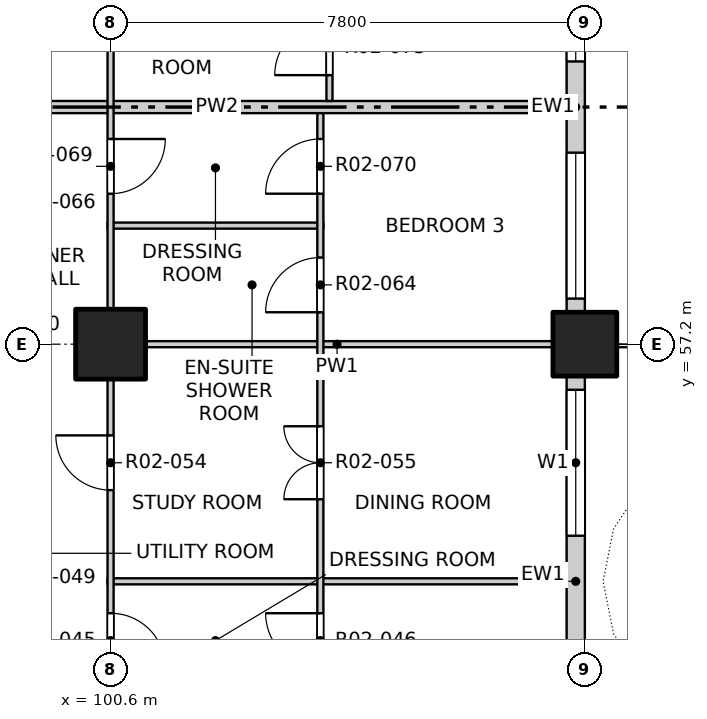
"""IFC4 building model, lengths in metres.
Left out: names, types, materials, properties, quantities, classifications, styles, units other than length and angle.
Written with IfcOpenShell. Run it as: python <this file> out.ifc"""

import sys

from ifc_helpers import new_model, si_unit, direction, frame, frame_2d, origin, origin_2d, place, context, subcontext, project, spatial, rectangle, extrude, element, fill, save


model = new_model("IFC4")
c1 = context("Model", 3, precision=1e-05, world=origin(), true_north=direction((0.0, 1.0)))
c2 = subcontext(c1, "Body", "Model", "MODEL_VIEW")
j1 = project(units=[si_unit("LENGTHUNIT", "METRE"), si_unit("PLANEANGLEUNIT", "RADIAN")], contexts=[c1])
p1 = place(None, origin())
s1 = spatial("IfcSite", under=j1, at=p1, CompositionType="ELEMENT")
p2 = place(p1, origin())
s2 = spatial("IfcBuilding", under=s1, at=p2, CompositionType="ELEMENT")
p3 = place(p2, frame((0.0, 0.0, 36.5)))
s3 = spatial("IfcBuildingStorey", under=s2, at=p3, CompositionType="ELEMENT", Elevation=36.5)
p4 = place(p3, frame((108.4, 57.2, -0.25), z_axis=(0.0, 0.0, 1.0), x_axis=(1.0, 0.0, 0.0)))
e1 = element("IfcColumn", 1, at=p4, inside=s3, PredefinedType="COLUMN", context=c2, shape_type="SweptSolid", body=[
    extrude(rectangle(XDim=1.05, YDim=1.05, at=origin_2d()), origin(), (0.0, 0.0, 1.0), 3.4),
])
p5 = place(p3, frame((100.6, 57.2, -0.25), z_axis=(0.0, 0.0, 1.0), x_axis=(1.0, 0.0, 0.0)))
e2 = element("IfcColumn", 2, at=p5, inside=s3, PredefinedType="COLUMN", context=c2, shape_type="SweptSolid", body=[
    extrude(rectangle(XDim=1.15, YDim=1.15, at=origin_2d()), origin(), (0.0, 0.0, 1.0), 3.4),
])
p6 = place(p3, frame((108.25, 49.925, 0.0), z_axis=(0.0, 0.0, 1.0), x_axis=(0.0, 1.0, 0.0)))
e3 = element("IfcWall", 3, at=p6, inside=s3, PredefinedType="SOLIDWALL", context=c2, shape_type="SweptSolid", body=[
    extrude(rectangle(XDim=6.75, YDim=0.3, at=frame_2d((3.375, 0.0))), origin(), (0.0, 0.0, 1.0), 2.7),
])
p7 = place(p6, frame((0.525, 0.0, 0.0)))
e4 = element("IfcOpeningElement", 4, at=p7, cuts=e3, PredefinedType="OPENING", context=c2, shape_type="SweptSolid", body=[
    extrude(rectangle(XDim=1.8, YDim=2.4, at=frame_2d((0.9, 1.2))), frame((0.0, 0.16, 0.0), z_axis=(0.0, -1.0, 0.0), x_axis=(1.0, 0.0, 0.0)), (0.0, 0.0, 1.0), 0.32),
])
p8 = place(p6, frame((4.125, 0.0, 0.9)))
e5 = element("IfcOpeningElement", 5, at=p8, cuts=e3, PredefinedType="OPENING", context=c2, shape_type="SweptSolid", body=[
    extrude(rectangle(XDim=2.4, YDim=1.8, at=frame_2d((1.2, 0.9))), frame((0.0, 0.16, 0.0), z_axis=(0.0, -1.0, 0.0), x_axis=(1.0, 0.0, 0.0)), (0.0, 0.0, 1.0), 0.32),
])
p9 = place(p3, frame((108.25, 57.725, 0.0), z_axis=(0.0, 0.0, 1.0), x_axis=(0.0, 1.0, 0.0)))
e6 = element("IfcWall", 6, at=p9, inside=s3, PredefinedType="SOLIDWALL", context=c2, shape_type="SweptSolid", body=[
    extrude(rectangle(XDim=6.75, YDim=0.3, at=frame_2d((3.375, 0.0))), origin(), (0.0, 0.0, 1.0), 2.7),
])
p10 = place(p9, frame((0.225, 0.0, 0.9)))
e7 = element("IfcOpeningElement", 7, at=p10, cuts=e6, PredefinedType="OPENING", context=c2, shape_type="SweptSolid", body=[
    extrude(rectangle(XDim=2.4, YDim=1.8, at=frame_2d((1.2, 0.9))), frame((0.0, 0.16, 0.0), z_axis=(0.0, -1.0, 0.0), x_axis=(1.0, 0.0, 0.0)), (0.0, 0.0, 1.0), 0.32),
])
p11 = place(p9, frame((4.125, 0.0, 0.9)))
e8 = element("IfcOpeningElement", 8, at=p11, cuts=e6, PredefinedType="OPENING", context=c2, shape_type="SweptSolid", body=[
    extrude(rectangle(XDim=2.4, YDim=1.8, at=frame_2d((1.2, 0.9))), frame((0.0, 0.16, 0.0), z_axis=(0.0, -1.0, 0.0), x_axis=(1.0, 0.0, 0.0)), (0.0, 0.0, 1.0), 0.32),
])
p12 = place(p3, frame((100.55, 53.3, 0.0), z_axis=(0.0, 0.0, 1.0), x_axis=(1.0, 0.0, 0.0)))
e9 = element("IfcWall", 9, at=p12, inside=s3, PredefinedType="PARTITIONING", context=c2, shape_type="SweptSolid", body=[
    extrude(rectangle(XDim=7.55, YDim=0.1, at=frame_2d((3.775, 0.0))), origin(), (0.0, 0.0, 1.0), 3.15),
])
p13 = place(p3, frame((100.55, 57.2, 0.0), z_axis=(0.0, 0.0, 1.0), x_axis=(1.0, 0.0, 0.0)))
e10 = element("IfcWall", 10, at=p13, inside=s3, PredefinedType="PARTITIONING", context=c2, shape_type="SweptSolid", body=[
    extrude(rectangle(XDim=7.55, YDim=0.1, at=frame_2d((3.775, 0.0))), origin(), (0.0, 0.0, 1.0), 2.55),
])
p14 = place(p3, frame((100.55, 59.15, 0.0), z_axis=(0.0, 0.0, 1.0), x_axis=(1.0, 0.0, 0.0)))
e11 = element("IfcWall", 11, at=p14, inside=s3, PredefinedType="PARTITIONING", context=c2, shape_type="SweptSolid", body=[
    extrude(rectangle(XDim=3.55, YDim=0.1, at=frame_2d((1.775, 0.0))), origin(), (0.0, 0.0, 1.0), 3.15),
])
p15 = place(p3, frame((96.6, 61.1, 0.0), z_axis=(0.0, 0.0, 1.0), x_axis=(1.0, 0.0, 0.0)))
e12 = element("IfcWall", 12, at=p15, inside=s3, PredefinedType="PARTITIONING", context=c2, shape_type="SweptSolid", body=[
    extrude(rectangle(XDim=11.5, YDim=0.2, at=frame_2d((5.75, 0.0))), origin(), (0.0, 0.0, 1.0), 3.15),
])
p16 = place(p3, frame((100.6, 49.4, 0.0), z_axis=(0.0, 0.0, 1.0), x_axis=(0.0, 1.0, 0.0)))
e13 = element("IfcWall", 13, at=p16, inside=s3, PredefinedType="PARTITIONING", context=c2, shape_type="SweptSolid", body=[
    extrude(rectangle(XDim=31.2, YDim=0.1, at=frame_2d((15.6, 0.0))), origin(), (0.0, 0.0, 1.0), 3.15),
])
p17 = place(p16, frame((2.475, 0.0, 0.0)))
e14 = element("IfcOpeningElement", 14, at=p17, cuts=e13, PredefinedType="OPENING", context=c2, shape_type="SweptSolid", body=[
    extrude(rectangle(XDim=0.9, YDim=2.1, at=frame_2d((0.45, 1.05))), frame((0.0, 0.06, 0.0), z_axis=(0.0, -1.0, 0.0), x_axis=(1.0, 0.0, 0.0)), (0.0, 0.0, 1.0), 0.12),
])
p18 = place(p16, frame((5.4, 0.0, 0.0)))
e15 = element("IfcOpeningElement", 15, at=p18, cuts=e13, PredefinedType="OPENING", context=c2, shape_type="SweptSolid", body=[
    extrude(rectangle(XDim=0.9, YDim=2.1, at=frame_2d((0.45, 1.05))), frame((0.0, 0.06, 0.0), z_axis=(0.0, -1.0, 0.0), x_axis=(1.0, 0.0, 0.0)), (0.0, 0.0, 1.0), 0.12),
])
p19 = place(p16, frame((10.275, 0.0, 0.0)))
e16 = element("IfcOpeningElement", 16, at=p19, cuts=e13, PredefinedType="OPENING", context=c2, shape_type="SweptSolid", body=[
    extrude(rectangle(XDim=0.9, YDim=2.1, at=frame_2d((0.45, 1.05))), frame((0.0, 0.06, 0.0), z_axis=(0.0, -1.0, 0.0), x_axis=(1.0, 0.0, 0.0)), (0.0, 0.0, 1.0), 0.12),
])
p20 = place(p16, frame((14.0, 0.0, 0.0)))
e17 = element("IfcOpeningElement", 17, at=p20, cuts=e13, PredefinedType="OPENING", context=c2, shape_type="SweptSolid", body=[
    extrude(rectangle(XDim=0.9, YDim=2.1, at=frame_2d((0.45, 1.05))), frame((0.0, 0.06, 0.0), z_axis=(0.0, -1.0, 0.0), x_axis=(1.0, 0.0, 0.0)), (0.0, 0.0, 1.0), 0.12),
])
p21 = place(p16, frame((17.1, 0.0, 0.0)))
e18 = element("IfcOpeningElement", 18, at=p21, cuts=e13, PredefinedType="OPENING", context=c2, shape_type="SweptSolid", body=[
    extrude(rectangle(XDim=0.9, YDim=2.1, at=frame_2d((0.45, 1.05))), frame((0.0, 0.06, 0.0), z_axis=(0.0, -1.0, 0.0), x_axis=(1.0, 0.0, 0.0)), (0.0, 0.0, 1.0), 0.12),
])
p22 = place(p16, frame((21.0, 0.0, 0.0)))
e19 = element("IfcOpeningElement", 19, at=p22, cuts=e13, PredefinedType="OPENING", context=c2, shape_type="SweptSolid", body=[
    extrude(rectangle(XDim=0.9, YDim=2.1, at=frame_2d((0.45, 1.05))), frame((0.0, 0.06, 0.0), z_axis=(0.0, -1.0, 0.0), x_axis=(1.0, 0.0, 0.0)), (0.0, 0.0, 1.0), 0.12),
])
p23 = place(p16, frame((25.875, 0.0, 0.0)))
e20 = element("IfcOpeningElement", 20, at=p23, cuts=e13, PredefinedType="OPENING", context=c2, shape_type="SweptSolid", body=[
    extrude(rectangle(XDim=0.9, YDim=2.1, at=frame_2d((0.45, 1.05))), frame((0.0, 0.06, 0.0), z_axis=(0.0, -1.0, 0.0), x_axis=(1.0, 0.0, 0.0)), (0.0, 0.0, 1.0), 0.12),
])
p24 = place(p16, frame((29.6, 0.0, 0.0)))
e21 = element("IfcOpeningElement", 21, at=p24, cuts=e13, PredefinedType="OPENING", context=c2, shape_type="SweptSolid", body=[
    extrude(rectangle(XDim=0.9, YDim=2.1, at=frame_2d((0.45, 1.05))), frame((0.0, 0.06, 0.0), z_axis=(0.0, -1.0, 0.0), x_axis=(1.0, 0.0, 0.0)), (0.0, 0.0, 1.0), 0.12),
])
p25 = place(p3, frame((104.05, 41.9, 0.0), z_axis=(0.0, 0.0, 1.0), x_axis=(0.0, 1.0, 0.0)))
e22 = element("IfcWall", 22, at=p25, inside=s3, PredefinedType="PARTITIONING", context=c2, shape_type="SweptSolid", body=[
    extrude(rectangle(XDim=19.1, YDim=0.1, at=frame_2d((9.55, 0.0))), origin(), (0.0, 0.0, 1.0), 3.15),
])
p26 = place(p25, frame((1.05, 0.0, 0.0)))
e23 = element("IfcOpeningElement", 23, at=p26, cuts=e22, PredefinedType="OPENING", context=c2, shape_type="SweptSolid", body=[
    extrude(rectangle(XDim=1.2, YDim=2.1, at=frame_2d((0.6, 1.05))), frame((0.0, 0.06, 0.0), z_axis=(0.0, -1.0, 0.0), x_axis=(1.0, 0.0, 0.0)), (0.0, 0.0, 1.0), 0.12),
])
p27 = place(p25, frame((4.95, 0.0, 0.0)))
e24 = element("IfcOpeningElement", 24, at=p27, cuts=e22, PredefinedType="OPENING", context=c2, shape_type="SweptSolid", body=[
    extrude(rectangle(XDim=1.2, YDim=2.1, at=frame_2d((0.6, 1.05))), frame((0.0, 0.06, 0.0), z_axis=(0.0, -1.0, 0.0), x_axis=(1.0, 0.0, 0.0)), (0.0, 0.0, 1.0), 0.12),
])
p28 = place(p25, frame((8.025, 0.0, 0.0)))
e25 = element("IfcOpeningElement", 25, at=p28, cuts=e22, PredefinedType="OPENING", context=c2, shape_type="SweptSolid", body=[
    extrude(rectangle(XDim=0.9, YDim=2.1, at=frame_2d((0.45, 1.05))), frame((0.0, 0.06, 0.0), z_axis=(0.0, -1.0, 0.0), x_axis=(1.0, 0.0, 0.0)), (0.0, 0.0, 1.0), 0.12),
])
p29 = place(p25, frame((9.975, 0.0, 0.0)))
e26 = element("IfcOpeningElement", 26, at=p29, cuts=e22, PredefinedType="OPENING", context=c2, shape_type="SweptSolid", body=[
    extrude(rectangle(XDim=0.9, YDim=2.1, at=frame_2d((0.45, 1.05))), frame((0.0, 0.06, 0.0), z_axis=(0.0, -1.0, 0.0), x_axis=(1.0, 0.0, 0.0)), (0.0, 0.0, 1.0), 0.12),
])
p30 = place(p25, frame((12.75, 0.0, 0.0)))
e27 = element("IfcOpeningElement", 27, at=p30, cuts=e22, PredefinedType="OPENING", context=c2, shape_type="SweptSolid", body=[
    extrude(rectangle(XDim=1.2, YDim=2.1, at=frame_2d((0.6, 1.05))), frame((0.0, 0.06, 0.0), z_axis=(0.0, -1.0, 0.0), x_axis=(1.0, 0.0, 0.0)), (0.0, 0.0, 1.0), 0.12),
])
p31 = place(p25, frame((15.825, 0.0, 0.0)))
e28 = element("IfcOpeningElement", 28, at=p31, cuts=e22, PredefinedType="OPENING", context=c2, shape_type="SweptSolid", body=[
    extrude(rectangle(XDim=0.9, YDim=2.1, at=frame_2d((0.45, 1.05))), frame((0.0, 0.06, 0.0), z_axis=(0.0, -1.0, 0.0), x_axis=(1.0, 0.0, 0.0)), (0.0, 0.0, 1.0), 0.12),
])
p32 = place(p25, frame((17.775, 0.0, 0.0)))
e29 = element("IfcOpeningElement", 29, at=p32, cuts=e22, PredefinedType="OPENING", context=c2, shape_type="SweptSolid", body=[
    extrude(rectangle(XDim=0.9, YDim=2.1, at=frame_2d((0.45, 1.05))), frame((0.0, 0.06, 0.0), z_axis=(0.0, -1.0, 0.0), x_axis=(1.0, 0.0, 0.0)), (0.0, 0.0, 1.0), 0.12),
])
p33 = place(p3, frame((104.2, 61.2, 0.0), z_axis=(0.0, 0.0, 1.0), x_axis=(0.0, 1.0, 0.0)))
e30 = element("IfcWall", 30, at=p33, inside=s3, PredefinedType="PARTITIONING", context=c2, shape_type="SweptSolid", body=[
    extrude(rectangle(XDim=11.5, YDim=0.1, at=frame_2d((5.75, 0.0))), origin(), (0.0, 0.0, 1.0), 3.15),
])
p34 = place(p33, frame((0.425, 0.0, 0.0)))
e31 = element("IfcOpeningElement", 31, at=p34, cuts=e30, PredefinedType="OPENING", context=c2, shape_type="SweptSolid", body=[
    extrude(rectangle(XDim=0.9, YDim=2.1, at=frame_2d((0.45, 1.05))), frame((0.0, 0.06, 0.0), z_axis=(0.0, -1.0, 0.0), x_axis=(1.0, 0.0, 0.0)), (0.0, 0.0, 1.0), 0.12),
])
p35 = place(p33, frame((2.375, 0.0, 0.0)))
e32 = element("IfcOpeningElement", 32, at=p35, cuts=e30, PredefinedType="OPENING", context=c2, shape_type="SweptSolid", body=[
    extrude(rectangle(XDim=0.9, YDim=2.1, at=frame_2d((0.45, 1.05))), frame((0.0, 0.06, 0.0), z_axis=(0.0, -1.0, 0.0), x_axis=(1.0, 0.0, 0.0)), (0.0, 0.0, 1.0), 0.12),
])
p36 = place(p33, frame((5.15, 0.0, 0.0)))
e33 = element("IfcOpeningElement", 33, at=p36, cuts=e30, PredefinedType="OPENING", context=c2, shape_type="SweptSolid", body=[
    extrude(rectangle(XDim=1.2, YDim=2.1, at=frame_2d((0.6, 1.05))), frame((0.0, 0.06, 0.0), z_axis=(0.0, -1.0, 0.0), x_axis=(1.0, 0.0, 0.0)), (0.0, 0.0, 1.0), 0.12),
])
p37 = place(p33, frame((9.05, 0.0, 0.0)))
e34 = element("IfcOpeningElement", 34, at=p37, cuts=e30, PredefinedType="OPENING", context=c2, shape_type="SweptSolid", body=[
    extrude(rectangle(XDim=1.2, YDim=2.1, at=frame_2d((0.6, 1.05))), frame((0.0, 0.06, 0.0), z_axis=(0.0, -1.0, 0.0), x_axis=(1.0, 0.0, 0.0)), (0.0, 0.0, 1.0), 0.12),
])
p38 = place(p8, origin())
e35 = element("IfcWindow", 35, at=p38, inside=s3, PartitioningType="DOUBLE_PANEL_VERTICAL", PredefinedType="WINDOW", context=c2, shape_type="SweptSolid", body=[
    extrude(rectangle(XDim=2.4, YDim=1.8, at=frame_2d((1.2, 0.9))), frame((0.0, 0.03, 0.0), z_axis=(0.0, -1.0, 0.0), x_axis=(1.0, 0.0, 0.0)), (0.0, 0.0, 1.0), 0.06),
])
fill(e5, e35)
p39 = place(p10, origin())
e36 = element("IfcWindow", 36, at=p39, inside=s3, PartitioningType="DOUBLE_PANEL_VERTICAL", PredefinedType="WINDOW", context=c2, shape_type="SweptSolid", body=[
    extrude(rectangle(XDim=2.4, YDim=1.8, at=frame_2d((1.2, 0.9))), frame((0.0, 0.03, 0.0), z_axis=(0.0, -1.0, 0.0), x_axis=(1.0, 0.0, 0.0)), (0.0, 0.0, 1.0), 0.06),
])
fill(e7, e36)
p40 = place(p11, origin())
e37 = element("IfcWindow", 37, at=p40, inside=s3, PartitioningType="DOUBLE_PANEL_VERTICAL", PredefinedType="WINDOW", context=c2, shape_type="SweptSolid", body=[
    extrude(rectangle(XDim=2.4, YDim=1.8, at=frame_2d((1.2, 0.9))), frame((0.0, 0.03, 0.0), z_axis=(0.0, -1.0, 0.0), x_axis=(1.0, 0.0, 0.0)), (0.0, 0.0, 1.0), 0.06),
])
fill(e8, e37)
p41 = place(p17, origin())
e38 = element("IfcDoor", 38, at=p41, inside=s3, OperationType="SINGLE_SWING_RIGHT", PredefinedType="DOOR", context=c2, shape_type="SweptSolid", body=[
    extrude(rectangle(XDim=0.9, YDim=2.1, at=frame_2d((0.45, 1.05))), frame((0.0, 0.025, 0.0), z_axis=(0.0, -1.0, 0.0), x_axis=(1.0, 0.0, 0.0)), (0.0, 0.0, 1.0), 0.05),
])
fill(e14, e38)
p42 = place(p29, origin())
e39 = element("IfcDoor", 39, at=p42, inside=s3, OperationType="SINGLE_SWING_RIGHT", PredefinedType="DOOR", context=c2, shape_type="SweptSolid", body=[
    extrude(rectangle(XDim=0.9, YDim=2.1, at=frame_2d((0.45, 1.05))), frame((0.0, 0.025, 0.0), z_axis=(0.0, -1.0, 0.0), x_axis=(1.0, 0.0, 0.0)), (0.0, 0.0, 1.0), 0.05),
])
fill(e26, e39)
p43 = place(p18, origin())
e40 = element("IfcDoor", 40, at=p43, inside=s3, OperationType="SINGLE_SWING_RIGHT", PredefinedType="DOOR", context=c2, shape_type="SweptSolid", body=[
    extrude(rectangle(XDim=0.9, YDim=2.1, at=frame_2d((0.45, 1.05))), frame((0.0, 0.025, 0.0), z_axis=(0.0, -1.0, 0.0), x_axis=(1.0, 0.0, 0.0)), (0.0, 0.0, 1.0), 0.05),
])
fill(e15, e40)
p44 = place(p30, origin())
e41 = element("IfcDoor", 41, at=p44, inside=s3, OperationType="DOUBLE_DOOR_SINGLE_SWING", PredefinedType="DOOR", context=c2, shape_type="SweptSolid", body=[
    extrude(rectangle(XDim=1.2, YDim=2.1, at=frame_2d((0.6, 1.05))), frame((0.0, 0.025, 0.0), z_axis=(0.0, -1.0, 0.0), x_axis=(1.0, 0.0, 0.0)), (0.0, 0.0, 1.0), 0.05),
])
fill(e27, e41)
p45 = place(p31, origin())
e42 = element("IfcDoor", 42, at=p45, inside=s3, OperationType="SINGLE_SWING_LEFT", PredefinedType="DOOR", context=c2, shape_type="SweptSolid", body=[
    extrude(rectangle(XDim=0.9, YDim=2.1, at=frame_2d((0.45, 1.05))), frame((0.0, 0.025, 0.0), z_axis=(0.0, -1.0, 0.0), x_axis=(1.0, 0.0, 0.0)), (0.0, 0.0, 1.0), 0.05),
])
fill(e28, e42)
p46 = place(p19, origin())
e43 = element("IfcDoor", 43, at=p46, inside=s3, OperationType="SINGLE_SWING_LEFT", PredefinedType="DOOR", context=c2, shape_type="SweptSolid", body=[
    extrude(rectangle(XDim=0.9, YDim=2.1, at=frame_2d((0.45, 1.05))), frame((0.0, 0.025, 0.0), z_axis=(0.0, -1.0, 0.0), x_axis=(1.0, 0.0, 0.0)), (0.0, 0.0, 1.0), 0.05),
])
fill(e16, e43)
p47 = place(p32, origin())
e44 = element("IfcDoor", 44, at=p47, inside=s3, OperationType="SINGLE_SWING_LEFT", PredefinedType="DOOR", context=c2, shape_type="SweptSolid", body=[
    extrude(rectangle(XDim=0.9, YDim=2.1, at=frame_2d((0.45, 1.05))), frame((0.0, 0.025, 0.0), z_axis=(0.0, -1.0, 0.0), x_axis=(1.0, 0.0, 0.0)), (0.0, 0.0, 1.0), 0.05),
])
fill(e29, e44)
p48 = place(p34, origin())
e45 = element("IfcDoor", 45, at=p48, inside=s3, OperationType="SINGLE_SWING_LEFT", PredefinedType="DOOR", context=c2, shape_type="SweptSolid", body=[
    extrude(rectangle(XDim=0.9, YDim=2.1, at=frame_2d((0.45, 1.05))), frame((0.0, 0.025, 0.0), z_axis=(0.0, -1.0, 0.0), x_axis=(1.0, 0.0, 0.0)), (0.0, 0.0, 1.0), 0.05),
])
fill(e31, e45)
save(model, sys.argv[1])
